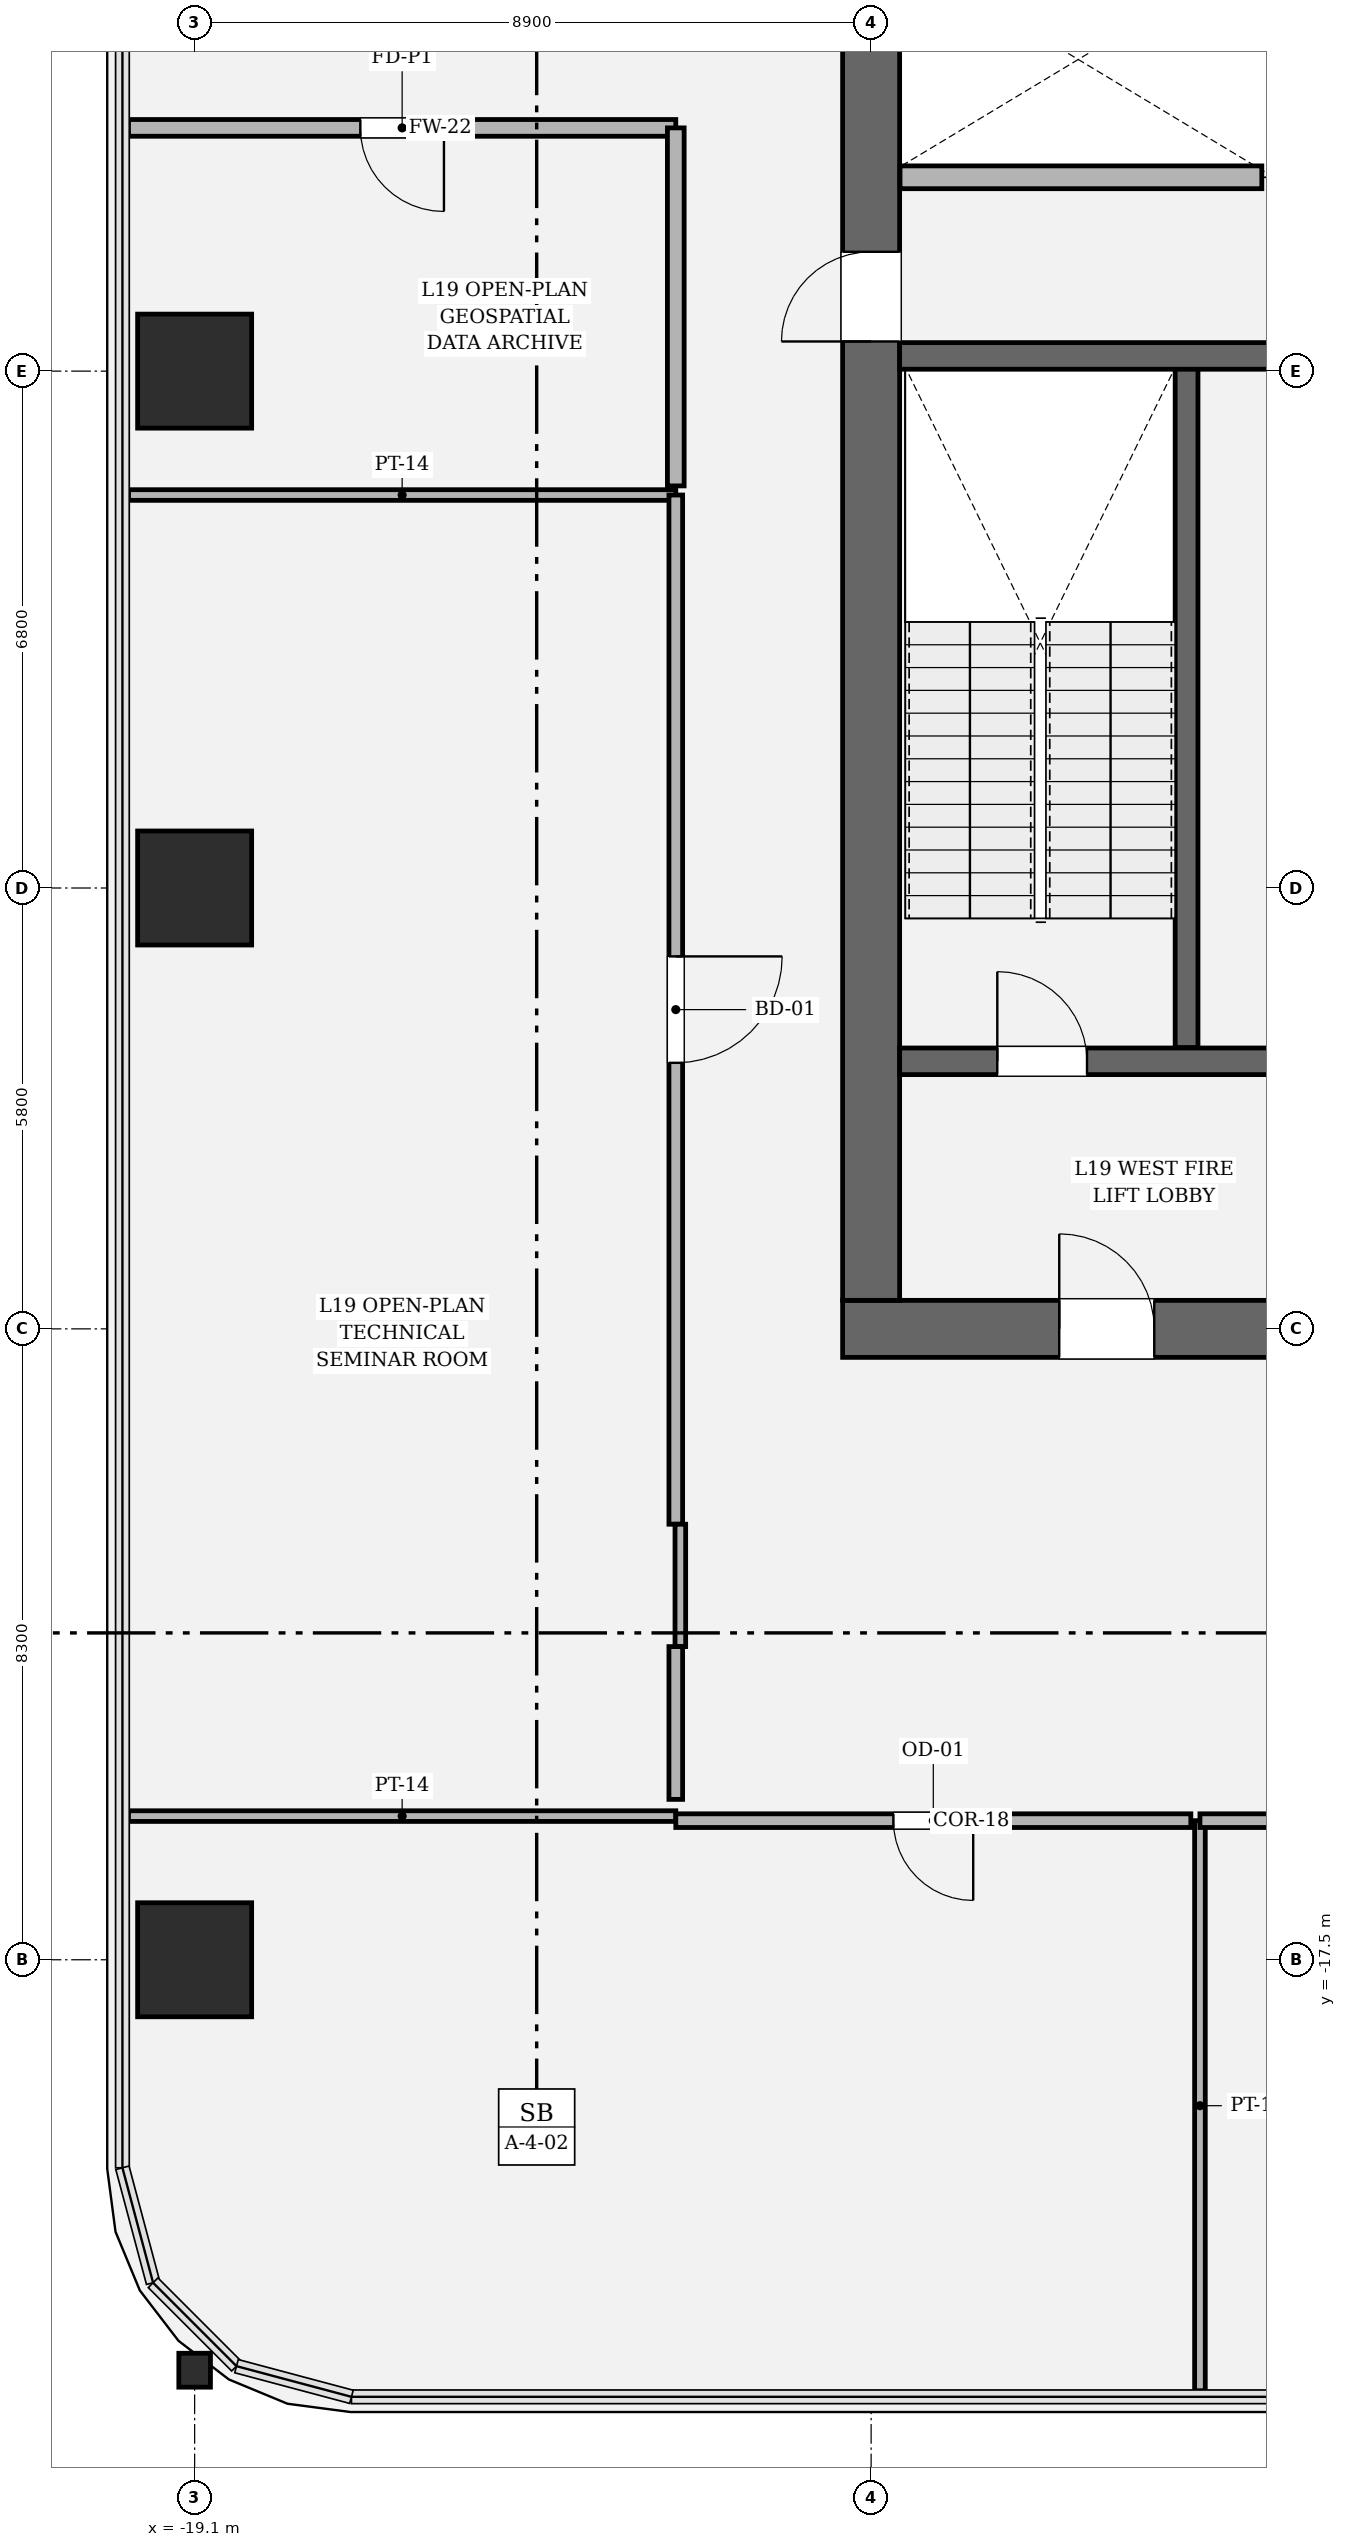
"""IFC4 building model, lengths in metres.
Left out: names, types, materials, properties, quantities, classifications, styles, units other than length and angle.
Written with IfcOpenShell. Run it as: python <this file> out.ifc"""

import sys

from ifc_helpers import new_model, si_unit, direction, frame, frame_2d, origin, origin_2d, place, context, subcontext, project, spatial, rectangle, hollow_rectangle, i_section, extrude, element, fill, save


model = new_model("IFC4")
c1 = context("Model", 3, precision=1e-05, world=origin(), true_north=direction((0.0, 1.0)))
c2 = subcontext(c1, "Body", "Model", "MODEL_VIEW")
j1 = project(units=[si_unit("LENGTHUNIT", "METRE"), si_unit("PLANEANGLEUNIT", "RADIAN")], contexts=[c1])
p1 = place(None, origin())
s1 = spatial("IfcSite", under=j1, at=p1, CompositionType="ELEMENT")
p2 = place(p1, origin())
s2 = spatial("IfcBuilding", under=s1, at=p2, CompositionType="ELEMENT")
p3 = place(p2, frame((0.0, 0.0, 84.9)))
s3 = spatial("IfcBuildingStorey", under=s2, at=p3, CompositionType="ELEMENT", Elevation=84.9)
p4 = place(p3, frame((10.575, -9.2, 0.0), z_axis=(0.0, 0.0, 1.0), x_axis=(-1.0, 0.0, 0.0)))
e1 = element("IfcWall", 1, at=p4, inside=s3, PredefinedType="SHEAR", context=c2, shape_type="SweptSolid", body=[
    extrude(rectangle(XDim=21.15, YDim=0.75, at=frame_2d((10.575, 0.0))), origin(), (0.0, 0.0, 1.0), 4.05),
])
p5 = place(p4, frame((2.85, 0.0, 0.0)))
e2 = element("IfcOpeningElement", 2, at=p5, cuts=e1, PredefinedType="OPENING", context=c2, shape_type="SweptSolid", body=[
    extrude(rectangle(XDim=1.25, YDim=2.25, at=frame_2d((0.625, 1.125))), frame((0.0, 0.385, 0.0), z_axis=(0.0, -1.0, 0.0), x_axis=(1.0, 0.0, 0.0)), (0.0, 0.0, 1.0), 0.77),
])
p6 = place(p4, frame((17.05, 0.0, 0.0)))
e3 = element("IfcOpeningElement", 3, at=p6, cuts=e1, PredefinedType="OPENING", context=c2, shape_type="SweptSolid", body=[
    extrude(rectangle(XDim=1.25, YDim=2.25, at=frame_2d((0.625, 1.125))), frame((0.0, 0.385, 0.0), z_axis=(0.0, -1.0, 0.0), x_axis=(1.0, 0.0, 0.0)), (0.0, 0.0, 1.0), 0.77),
])
p7 = place(p3, frame((-10.2, -8.825, 0.0), z_axis=(0.0, 0.0, 1.0), x_axis=(0.0, 1.0, 0.0)))
e4 = element("IfcWall", 4, at=p7, inside=s3, PredefinedType="SHEAR", context=c2, shape_type="SweptSolid", body=[
    extrude(rectangle(XDim=17.65, YDim=0.75, at=frame_2d((8.825, 0.0))), origin(), (0.0, 0.0, 1.0), 4.05),
])
p8 = place(p7, frame((12.615, 0.0, 0.0)))
e5 = element("IfcOpeningElement", 5, at=p8, cuts=e4, PredefinedType="OPENING", context=c2, shape_type="SweptSolid", body=[
    extrude(rectangle(XDim=1.18, YDim=2.2, at=frame_2d((0.59, 1.1))), frame((0.0, 0.385, 0.0), z_axis=(0.0, -1.0, 0.0), x_axis=(1.0, 0.0, 0.0)), (0.0, 0.0, 1.0), 0.77),
])
p9 = place(p3, frame((-6.05, -5.5, 0.0), z_axis=(0.0, 0.0, 1.0), x_axis=(0.0, 1.0, 0.0)))
e6 = element("IfcWall", 6, at=p9, inside=s3, PredefinedType="SOLIDWALL", context=c2, shape_type="SweptSolid", body=[
    extrude(rectangle(XDim=8.95, YDim=0.3, at=frame_2d((4.475, 0.0))), origin(), (0.0, 0.0, 1.0), 4.05),
])
p10 = place(p3, frame((-9.825, -5.68, 0.0), z_axis=(0.0, 0.0, 1.0), x_axis=(1.0, 0.0, 0.0)))
e7 = element("IfcWall", 7, at=p10, inside=s3, PredefinedType="SOLIDWALL", context=c2, shape_type="SweptSolid", body=[
    extrude(rectangle(XDim=5.175, YDim=0.35, at=frame_2d((2.587, 0.0))), origin(), (0.0, 0.0, 1.0), 4.05),
])
p11 = place(p10, frame((1.285, 0.0, 0.0)))
e8 = element("IfcOpeningElement", 8, at=p11, cuts=e7, PredefinedType="OPENING", context=c2, shape_type="SweptSolid", body=[
    extrude(rectangle(XDim=1.18, YDim=2.2, at=frame_2d((0.59, 1.1))), frame((0.0, 0.185, 0.0), z_axis=(0.0, -1.0, 0.0), x_axis=(1.0, 0.0, 0.0)), (0.0, 0.0, 1.0), 0.37),
])
p12 = place(p3, frame((-9.825, 3.6, 0.0), z_axis=(0.0, 0.0, 1.0), x_axis=(1.0, 0.0, 0.0)))
e9 = element("IfcWall", 9, at=p12, inside=s3, PredefinedType="SOLIDWALL", context=c2, shape_type="SweptSolid", body=[
    extrude(rectangle(XDim=5.175, YDim=0.35, at=frame_2d((2.587, 0.0))), origin(), (0.0, 0.0, 1.0), 4.05),
])
for number, where, z_axis, x_axis in (
    (10, (-19.1, -17.5, 0.0), (0.0, 0.0, 1.0), (1.0, 0.0, 0.0)),
    (11, (-19.1, 3.4, 0.0), (0.0, 0.0, 1.0), (1.0, 0.0, 0.0)),
    (12, (-19.1, -3.4, 0.0), (0.0, 0.0, 1.0), (1.0, 0.0, 0.0)),
):
    element("IfcColumn", number, at=place(p3, frame(where, z_axis=z_axis, x_axis=x_axis)), inside=s3, PredefinedType="COLUMN", context=c2, shape_type="SweptSolid", body=[
        extrude(hollow_rectangle(XDim=1.5, YDim=1.5, WallThickness=0.045, at=origin_2d()), origin(), (0.0, 0.0, 1.0), 4.05),
    ])
p13 = place(p3, frame((-19.1, -22.9, 0.0), z_axis=(0.0, 0.0, 1.0), x_axis=(1.0, 0.0, 0.0)))
e13 = element("IfcColumn", 13, at=p13, inside=s3, PredefinedType="COLUMN", context=c2, shape_type="SweptSolid", body=[
    extrude(i_section(OverallWidth=0.416, OverallDepth=0.446, WebThickness=0.039, FlangeThickness=0.062, FilletRadius=0.018, at=origin_2d()), origin(), (0.0, 0.0, 1.0), 4.048),
])
p14 = place(p3, frame((-9.82, 5.95, 0.0), z_axis=(0.0, 0.0, 1.0), x_axis=(1.0, 0.0, 0.0)))
e14 = element("IfcWall", 14, at=p14, inside=s3, PredefinedType="SOLIDWALL", context=c2, shape_type="SweptSolid", body=[
    extrude(rectangle(XDim=4.76, YDim=0.3, at=frame_2d((2.38, 0.0))), origin(), (0.0, 0.0, 1.0), 3.81),
])
p15 = place(p3, frame((-5.874, -23.17, 0.0), z_axis=(0.0, 0.0, 1.0), x_axis=(0.0, 1.0, 0.0)))
e15 = element("IfcWall", 15, at=p15, inside=s3, PredefinedType="PARTITIONING", context=c2, shape_type="SweptSolid", body=[
    extrude(rectangle(XDim=7.5, YDim=0.14, at=frame_2d((3.75, 0.0))), origin(), (0.0, 0.0, 1.0), 2.524),
])
p16 = place(p3, frame((-5.874, -15.67, 0.0), z_axis=(0.0, 0.0, 1.0), x_axis=(1.0, 0.0, 0.0)))
e16 = element("IfcWall", 16, at=p16, inside=s3, PredefinedType="PARTITIONING", context=c2, shape_type="SweptSolid", body=[
    extrude(rectangle(XDim=13.274, YDim=0.18, at=frame_2d((6.637, 0.0))), origin(), (0.0, 0.0, 1.0), 3.104),
])
p17 = place(p3, frame((-19.97, -15.61, 0.0), z_axis=(0.0, 0.0, 1.0), x_axis=(1.0, 0.0, 0.0)))
e17 = element("IfcWall", 17, at=p17, inside=s3, PredefinedType="PARTITIONING", context=c2, shape_type="SweptSolid", body=[
    extrude(rectangle(XDim=7.2, YDim=0.14, at=frame_2d((3.6, 0.0))), origin(), (0.0, 0.0, 1.0), 3.104),
])
p18 = place(p3, frame((-12.77, -15.67, 0.0), z_axis=(0.0, 0.0, 1.0), x_axis=(1.0, 0.0, 0.0)))
e18 = element("IfcWall", 18, at=p18, inside=s3, PredefinedType="PARTITIONING", context=c2, shape_type="SweptSolid", body=[
    extrude(rectangle(XDim=6.776, YDim=0.18, at=frame_2d((3.388, 0.0))), origin(), (0.0, 0.0, 1.0), 3.104),
])
p19 = place(p18, frame((2.863, 0.0, 0.0)))
e19 = element("IfcOpeningElement", 19, at=p19, cuts=e18, PredefinedType="OPENING", context=c2, shape_type="SweptSolid", body=[
    extrude(rectangle(XDim=1.05, YDim=2.2, at=frame_2d((0.525, 1.1))), frame((0.0, 0.1, 0.0), z_axis=(0.0, -1.0, 0.0), x_axis=(1.0, 0.0, 0.0)), (0.0, 0.0, 1.0), 0.2),
])
p20 = place(p3, frame((-19.97, 1.77, 0.0), z_axis=(0.0, 0.0, 1.0), x_axis=(1.0, 0.0, 0.0)))
e20 = element("IfcWall", 20, at=p20, inside=s3, PredefinedType="PARTITIONING", context=c2, shape_type="SweptSolid", body=[
    extrude(rectangle(XDim=7.2, YDim=0.14, at=frame_2d((3.6, 0.0))), origin(), (0.0, 0.0, 1.0), 3.104),
])
p21 = place(p3, frame((-12.77, 1.77, 0.0), z_axis=(0.0, 0.0, 1.0), x_axis=(0.0, -1.0, 0.0)))
e21 = element("IfcWall", 21, at=p21, inside=s3, PredefinedType="PARTITIONING", context=c2, shape_type="SweptSolid", body=[
    extrude(rectangle(XDim=13.54, YDim=0.18, at=frame_2d((6.77, 0.0))), origin(), (0.0, 0.0, 1.0), 3.104),
])
p22 = place(p21, frame((6.07, 0.0, 0.0)))
e22 = element("IfcOpeningElement", 22, at=p22, cuts=e21, PredefinedType="OPENING", context=c2, shape_type="SweptSolid", body=[
    extrude(rectangle(XDim=1.4, YDim=2.25, at=frame_2d((0.7, 1.125))), frame((0.0, 0.1, 0.0), z_axis=(0.0, -1.0, 0.0), x_axis=(1.0, 0.0, 0.0)), (0.0, 0.0, 1.0), 0.2),
])
p23 = place(p3, frame((-12.71, -11.77, 0.0), z_axis=(0.0, 0.0, 1.0), x_axis=(0.0, -1.0, 0.0)))
e23 = element("IfcWall", 23, at=p23, inside=s3, PredefinedType="PARTITIONING", context=c2, shape_type="SweptSolid", body=[
    extrude(rectangle(XDim=1.61, YDim=0.14, at=frame_2d((0.805, 0.0))), origin(), (0.0, 0.0, 1.0), 3.354),
])
p24 = place(p3, frame((-12.77, -13.38, 0.0), z_axis=(0.0, 0.0, 1.0), x_axis=(0.0, -1.0, 0.0)))
e24 = element("IfcWall", 24, at=p24, inside=s3, PredefinedType="PARTITIONING", context=c2, shape_type="SweptSolid", body=[
    extrude(rectangle(XDim=2.01, YDim=0.18, at=frame_2d((1.005, 0.0))), origin(), (0.0, 0.0, 1.0), 3.354),
])
p25 = place(p3, frame((-19.97, 6.6, 0.0), z_axis=(0.0, 0.0, 1.0), x_axis=(1.0, 0.0, 0.0)))
e25 = element("IfcWall", 25, at=p25, inside=s3, PredefinedType="SOLIDWALL", context=c2, shape_type="SweptSolid", body=[
    extrude(rectangle(XDim=7.2, YDim=0.22, at=frame_2d((3.6, 0.0))), origin(), (0.0, 0.0, 1.0), 3.104),
])
p26 = place(p25, frame((3.05, 0.0, 0.0)))
e26 = element("IfcOpeningElement", 26, at=p26, cuts=e25, PredefinedType="OPENING", context=c2, shape_type="SweptSolid", body=[
    extrude(rectangle(XDim=1.1, YDim=2.2, at=frame_2d((0.55, 1.1))), frame((0.0, 0.12, 0.0), z_axis=(0.0, -1.0, 0.0), x_axis=(1.0, 0.0, 0.0)), (0.0, 0.0, 1.0), 0.24),
])
p27 = place(p3, frame((-12.77, 6.6, 0.0), z_axis=(0.0, 0.0, 1.0), x_axis=(0.0, -1.0, 0.0)))
e27 = element("IfcWall", 27, at=p27, inside=s3, PredefinedType="SOLIDWALL", context=c2, shape_type="SweptSolid", body=[
    extrude(rectangle(XDim=4.71, YDim=0.22, at=frame_2d((2.355, 0.0))), origin(), (0.0, 0.0, 1.0), 3.104),
])
p28 = place(p11, origin())
e28 = element("IfcDoor", 28, at=p28, inside=s3, OperationType="SINGLE_SWING_LEFT", PredefinedType="DOOR", context=c2, shape_type="SweptSolid", body=[
    extrude(rectangle(XDim=1.18, YDim=2.2, at=frame_2d((0.59, 1.1))), frame((0.0, 0.025, 0.0), z_axis=(0.0, -1.0, 0.0), x_axis=(1.0, 0.0, 0.0)), (0.0, 0.0, 1.0), 0.05),
])
fill(e8, e28)
p29 = place(p6, origin())
e29 = element("IfcDoor", 29, at=p29, inside=s3, OperationType="SINGLE_SWING_RIGHT", PredefinedType="DOOR", context=c2, shape_type="SweptSolid", body=[
    extrude(rectangle(XDim=1.25, YDim=2.25, at=frame_2d((0.625, 1.125))), frame((0.0, 0.025, 0.0), z_axis=(0.0, -1.0, 0.0), x_axis=(1.0, 0.0, 0.0)), (0.0, 0.0, 1.0), 0.05),
])
fill(e3, e29)
p30 = place(p8, origin())
e30 = element("IfcDoor", 30, at=p30, inside=s3, OperationType="SINGLE_SWING_LEFT", PredefinedType="DOOR", context=c2, shape_type="SweptSolid", body=[
    extrude(rectangle(XDim=1.18, YDim=2.2, at=frame_2d((0.59, 1.1))), frame((0.0, 0.025, 0.0), z_axis=(0.0, -1.0, 0.0), x_axis=(1.0, 0.0, 0.0)), (0.0, 0.0, 1.0), 0.05),
])
fill(e5, e30)
p31 = place(p19, origin())
e31 = element("IfcDoor", 31, at=p31, inside=s3, OperationType="SINGLE_SWING_RIGHT", PredefinedType="DOOR", context=c2, shape_type="SweptSolid", body=[
    extrude(rectangle(XDim=1.05, YDim=2.2, at=frame_2d((0.525, 1.1))), frame((0.0, 0.025, 0.0), z_axis=(0.0, -1.0, 0.0), x_axis=(1.0, 0.0, 0.0)), (0.0, 0.0, 1.0), 0.05),
])
fill(e19, e31)
p32 = place(p22, origin())
e32 = element("IfcDoor", 32, at=p32, inside=s3, OperationType="SINGLE_SWING_LEFT", PredefinedType="DOOR", context=c2, shape_type="SweptSolid", body=[
    extrude(rectangle(XDim=1.4, YDim=2.25, at=frame_2d((0.7, 1.125))), frame((0.0, 0.025, 0.0), z_axis=(0.0, -1.0, 0.0), x_axis=(1.0, 0.0, 0.0)), (0.0, 0.0, 1.0), 0.05),
])
fill(e22, e32)
p33 = place(p26, origin())
e33 = element("IfcDoor", 33, at=p33, inside=s3, OperationType="SINGLE_SWING_RIGHT", PredefinedType="DOOR", context=c2, shape_type="SweptSolid", body=[
    extrude(rectangle(XDim=1.1, YDim=2.2, at=frame_2d((0.55, 1.1))), frame((0.0, 0.025, 0.0), z_axis=(0.0, -1.0, 0.0), x_axis=(1.0, 0.0, 0.0)), (0.0, 0.0, 1.0), 0.05),
])
fill(e26, e33)
save(model, sys.argv[1])
